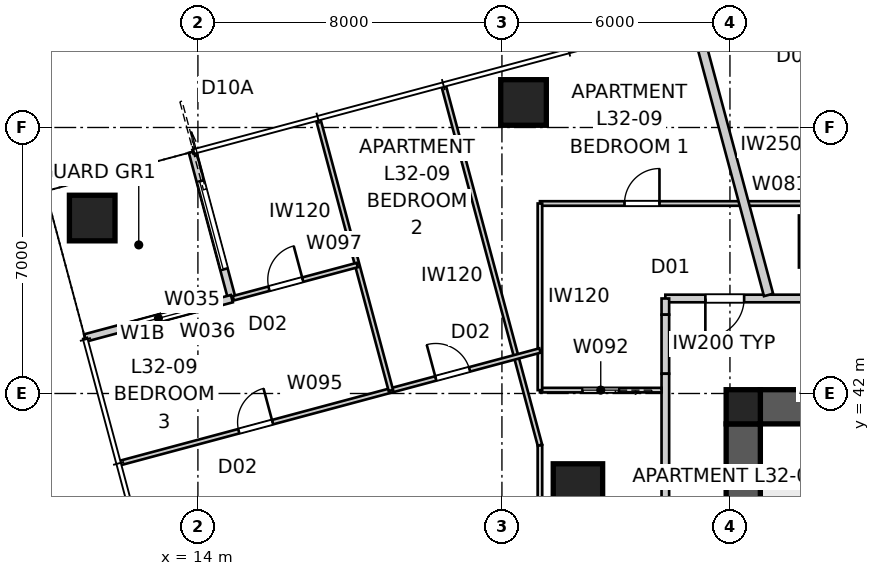
"""IFC4 building model, lengths in metres.
Left out: names, types, materials, properties, quantities, classifications, styles, units other than length and angle.
Written with IfcOpenShell. Run it as: python <this file> out.ifc"""

import sys

from ifc_helpers import new_model, si_unit, direction, frame, frame_2d, origin, origin_2d, place, context, subcontext, project, spatial, polyline, rectangle, outline, extrude, element, fill, save


model = new_model("IFC4")
c1 = context("Model", 3, precision=1e-05, world=origin(), true_north=direction((0.0, 1.0)))
c2 = subcontext(c1, "Body", "Model", "MODEL_VIEW")
j1 = project(units=[si_unit("LENGTHUNIT", "METRE"), si_unit("PLANEANGLEUNIT", "RADIAN")], contexts=[c1])
p1 = place(None, origin())
s1 = spatial("IfcSite", under=j1, at=p1, CompositionType="ELEMENT")
p2 = place(p1, origin())
s2 = spatial("IfcBuilding", under=s1, at=p2, CompositionType="ELEMENT")
p3 = place(p2, frame((0.0, 0.0, 118.4)))
s3 = spatial("IfcBuildingStorey", under=s2, at=p3, CompositionType="ELEMENT", Elevation=118.4)
p4 = place(p3, frame((28.8, 41.65, 0.0), z_axis=(0.0, 0.0, 1.0), x_axis=(1.0, 0.0, 0.0)))
e1 = element("IfcWall", 1, at=p4, inside=s3, PredefinedType="SHEAR", context=c2, shape_type="SweptSolid", body=[
    extrude(outline(polyline([(0.0, -0.45), (22.4, -0.45), (22.4, -0.025), (22.85, -0.025), (22.85, 0.025), (22.4, 0.025), (22.4, 0.45), (0.0, 0.45), (0.0, 0.025), (-0.45, 0.025), (-0.45, -0.025), (0.0, -0.025), (0.0, -0.45)])), origin(), (0.0, 0.0, 1.0), 3.4),
])
p5 = place(p3, frame((28.35, 41.2, 0.0), z_axis=(0.0, 0.0, 1.0), x_axis=(0.0, -1.0, 0.0)))
e2 = element("IfcWall", 2, at=p5, inside=s3, PredefinedType="SHEAR", context=c2, shape_type="SweptSolid", body=[
    extrude(outline(polyline([(0.0, -0.45), (22.4, -0.45), (22.4, -0.025), (22.85, -0.025), (22.85, 0.025), (22.4, 0.025), (22.4, 0.45), (0.0, 0.45), (0.0, 0.025), (-0.45, 0.025), (-0.45, -0.025), (0.0, -0.025), (0.0, -0.45)])), origin(), (0.0, 0.0, 1.0), 3.4),
])
p6 = place(p5, frame((11.14, 0.0, 0.0)))
e3 = element("IfcOpeningElement", 3, at=p6, cuts=e2, PredefinedType="OPENING", context=c2, shape_type="SweptSolid", body=[
    extrude(rectangle(XDim=1.02, YDim=2.4, at=frame_2d((0.51, 1.2))), frame((0.0, 0.46, 0.0), z_axis=(0.0, -1.0, 0.0), x_axis=(1.0, 0.0, 0.0)), (0.0, 0.0, 1.0), 0.92),
])
p7 = place(p3, frame((28.8, 39.75, 0.0), z_axis=(0.0, 0.0, 1.0), x_axis=(1.0, 0.0, 0.0)))
e4 = element("IfcWall", 4, at=p7, inside=s3, PredefinedType="SHEAR", context=c2, shape_type="SweptSolid", body=[
    extrude(rectangle(XDim=3.5, YDim=0.3, at=frame_2d((1.75, 0.0))), origin(), (0.0, 0.0, 1.0), 3.4),
])
p8 = place(p3, frame((28.35, 41.65, 0.0), z_axis=(0.0, 0.0, 1.0), x_axis=(1.0, 0.0, 0.0)))
e5 = element("IfcColumn", 5, at=p8, inside=s3, PredefinedType="COLUMN", context=c2, shape_type="SweptSolid", body=[
    extrude(rectangle(XDim=0.9, YDim=0.9, at=origin_2d()), origin(), (0.0, 0.0, 1.0), 3.4),
])
for number, where, z_axis, x_axis in (
    (6, (22.568, 49.658, 0.0), (0.0, 0.0, 1.0), (1.0, 0.0, 0.0)),
    (7, (11.219, 46.617, 0.0), (0.0, 0.0, 1.0), (1.0, 0.0, 0.0)),
):
    element("IfcColumn", number, at=place(p3, frame(where, z_axis=z_axis, x_axis=x_axis)), inside=s3, PredefinedType="COLUMN", context=c2, shape_type="SweptSolid", body=[
        extrude(rectangle(XDim=1.2, YDim=1.2, at=origin_2d()), origin(), (0.0, 0.0, 1.0), 3.4),
    ])
for number, where, z_axis, x_axis in (
    (8, (30.5, 46.0, 0.0), (0.0, 0.0, 1.0), (1.0, 0.0, 0.0)),
    (9, (24.0, 39.5, 0.0), (0.0, 0.0, 1.0), (1.0, 0.0, 0.0)),
):
    element("IfcColumn", number, at=place(p3, frame(where, z_axis=z_axis, x_axis=x_axis)), inside=s3, PredefinedType="COLUMN", context=c2, shape_type="SweptSolid", body=[
        extrude(rectangle(XDim=1.3, YDim=1.3, at=origin_2d()), origin(), (0.0, 0.0, 1.0), 3.4),
    ])
p9 = place(p3, frame((13.857, 48.359, 0.0), z_axis=(0.0, 0.0, 1.0), x_axis=(0.258843877716, -0.965919172068, 0.0)))
e10 = element("IfcWall", 10, at=p9, inside=s3, PredefinedType="SOLIDWALL", context=c2, shape_type="SweptSolid", body=[
    extrude(rectangle(XDim=4.0, YDim=0.2, at=frame_2d((2.0, 0.0))), origin(), (0.0, 0.0, 1.0), 3.25),
])
p10 = place(p9, frame((0.8, 0.0, 0.0)))
e11 = element("IfcOpeningElement", 11, at=p10, cuts=e10, PredefinedType="OPENING", context=c2, shape_type="SweptSolid", body=[
    extrude(rectangle(XDim=2.4, YDim=2.1, at=frame_2d((1.2, 1.05))), frame((0.0, 0.11, 0.0), z_axis=(0.0, -1.0, 0.0), x_axis=(1.0, 0.0, 0.0)), (0.0, 0.0, 1.0), 0.22),
])
p11 = place(p3, frame((14.893, 44.496, 0.0), z_axis=(0.0, 0.0, 1.0), x_axis=(-0.965934430412, -0.258786931944, 0.0)))
e12 = element("IfcWall", 12, at=p11, inside=s3, PredefinedType="SOLIDWALL", context=c2, shape_type="SweptSolid", body=[
    extrude(rectangle(XDim=4.0, YDim=0.2, at=frame_2d((2.0, 0.0))), origin(), (0.0, 0.0, 1.0), 3.25),
])
p12 = place(p11, frame((1.0, 0.0, 0.45)))
e13 = element("IfcOpeningElement", 13, at=p12, cuts=e12, PredefinedType="OPENING", context=c2, shape_type="SweptSolid", body=[
    extrude(rectangle(XDim=2.0, YDim=1.8, at=frame_2d((1.0, 0.9))), frame((0.0, 0.11, 0.0), z_axis=(0.0, -1.0, 0.0), x_axis=(1.0, 0.0, 0.0)), (0.0, 0.0, 1.0), 0.22),
])
p13 = place(p3, frame((54.5, 44.5, 0.0), z_axis=(0.0, 0.0, 1.0), x_axis=(-1.0, 0.0, 0.0)))
e14 = element("IfcWall", 14, at=p13, inside=s3, PredefinedType="PARTITIONING", context=c2, shape_type="SweptSolid", body=[
    extrude(rectangle(XDim=28.2, YDim=0.2, at=frame_2d((14.1, 0.0))), origin(), (0.0, 0.0, 1.0), 3.25),
])
p14 = place(p13, frame((10.837, 0.0, 0.0)))
e15 = element("IfcOpeningElement", 15, at=p14, cuts=e14, PredefinedType="OPENING", context=c2, shape_type="SweptSolid", body=[
    extrude(rectangle(XDim=1.02, YDim=2.34, at=frame_2d((0.51, 1.17))), frame((0.0, 0.11, 0.0), z_axis=(0.0, -1.0, 0.0), x_axis=(1.0, 0.0, 0.0)), (0.0, 0.0, 1.0), 0.22),
])
p15 = place(p13, frame((5.7, 0.0, 0.0)))
e16 = element("IfcOpeningElement", 16, at=p15, cuts=e14, PredefinedType="OPENING", context=c2, shape_type="SweptSolid", body=[
    extrude(rectangle(XDim=1.02, YDim=2.34, at=frame_2d((0.51, 1.17))), frame((0.0, 0.11, 0.0), z_axis=(0.0, -1.0, 0.0), x_axis=(1.0, 0.0, 0.0)), (0.0, 0.0, 1.0), 0.22),
])
p16 = place(p13, frame((26.127, 0.0, 0.0)))
e17 = element("IfcOpeningElement", 17, at=p16, cuts=e14, PredefinedType="OPENING", context=c2, shape_type="SweptSolid", body=[
    extrude(rectangle(XDim=1.02, YDim=2.34, at=frame_2d((0.51, 1.17))), frame((0.0, 0.11, 0.0), z_axis=(0.0, -1.0, 0.0), x_axis=(1.0, 0.0, 0.0)), (0.0, 0.0, 1.0), 0.22),
])
p17 = place(p3, frame((26.3, 44.5, 0.0), z_axis=(0.0, 0.0, 1.0), x_axis=(0.0, -1.0, 0.0)))
e18 = element("IfcWall", 18, at=p17, inside=s3, PredefinedType="PARTITIONING", context=c2, shape_type="SweptSolid", body=[
    extrude(rectangle(XDim=0.426, YDim=0.2, at=frame_2d((0.213, 0.0))), origin(), (0.0, 0.0, 1.0), 3.25),
])
p18 = place(p3, frame((26.3, 44.074, 0.0), z_axis=(0.0, 0.0, 1.0), x_axis=(0.0, -1.0, 0.0)))
e19 = element("IfcWall", 19, at=p18, inside=s3, PredefinedType="PARTITIONING", context=c2, shape_type="SweptSolid", body=[
    extrude(rectangle(XDim=1.554, YDim=0.2, at=frame_2d((0.777, 0.0))), origin(), (0.0, 0.0, 1.0), 2.722),
])
p19 = place(p3, frame((26.3, 42.52, 0.0), z_axis=(0.0, 0.0, 1.0), x_axis=(0.0, -1.0, 0.0)))
e20 = element("IfcWall", 20, at=p19, inside=s3, PredefinedType="PARTITIONING", context=c2, shape_type="SweptSolid", body=[
    extrude(rectangle(XDim=27.02, YDim=0.2, at=frame_2d((13.51, 0.0))), origin(), (0.0, 0.0, 1.0), 3.25),
])
p20 = place(p19, frame((23.584, 0.0, 0.0)))
e21 = element("IfcOpeningElement", 21, at=p20, cuts=e20, PredefinedType="OPENING", context=c2, shape_type="SweptSolid", body=[
    extrude(rectangle(XDim=1.02, YDim=2.1, at=frame_2d((0.51, 1.05))), frame((0.0, 0.11, 0.0), z_axis=(0.0, -1.0, 0.0), x_axis=(1.0, 0.0, 0.0)), (0.0, 0.0, 1.0), 0.22),
])
p21 = place(p19, frame((13.468, 0.0, 0.0)))
e22 = element("IfcOpeningElement", 22, at=p21, cuts=e20, PredefinedType="OPENING", context=c2, shape_type="SweptSolid", body=[
    extrude(rectangle(XDim=1.02, YDim=2.34, at=frame_2d((0.51, 1.17))), frame((0.0, 0.11, 0.0), z_axis=(0.0, -1.0, 0.0), x_axis=(1.0, 0.0, 0.0)), (0.0, 0.0, 1.0), 0.22),
])
p22 = place(p3, frame((27.058, 51.896, 0.0), z_axis=(0.0, 0.0, 1.0), x_axis=(0.258822171171, -0.965924988656, 0.0)))
e23 = element("IfcWall", 23, at=p22, inside=s3, PredefinedType="PARTITIONING", context=c2, shape_type="SweptSolid", body=[
    extrude(rectangle(XDim=7.56, YDim=0.25, at=frame_2d((3.78, 0.0))), origin(), (0.0, 0.0, 1.0), 3.25),
])
p23 = place(p3, frame((23.0, 13.0, 0.0), z_axis=(0.0, 0.0, 1.0), x_axis=(0.0, 1.0, 0.0)))
e24 = element("IfcWall", 24, at=p23, inside=s3, PredefinedType="PARTITIONING", context=c2, shape_type="SweptSolid", body=[
    extrude(rectangle(XDim=27.64, YDim=0.12, at=frame_2d((13.82, 0.0))), origin(), (0.0, 0.0, 1.0), 2.55),
])
p24 = place(p23, frame((3.192, 0.0, 0.0)))
e25 = element("IfcOpeningElement", 25, at=p24, cuts=e24, PredefinedType="OPENING", context=c2, shape_type="SweptSolid", body=[
    extrude(rectangle(XDim=0.92, YDim=2.34, at=frame_2d((0.46, 1.17))), frame((0.0, 0.07, 0.0), z_axis=(0.0, -1.0, 0.0), x_axis=(1.0, 0.0, 0.0)), (0.0, 0.0, 1.0), 0.14),
])
p25 = place(p23, frame((13.779, 0.0, 0.0)))
e26 = element("IfcOpeningElement", 26, at=p25, cuts=e24, PredefinedType="OPENING", context=c2, shape_type="SweptSolid", body=[
    extrude(rectangle(XDim=0.92, YDim=2.34, at=frame_2d((0.46, 1.17))), frame((0.0, 0.07, 0.0), z_axis=(0.0, -1.0, 0.0), x_axis=(1.0, 0.0, 0.0)), (0.0, 0.0, 1.0), 0.14),
])
p26 = place(p23, frame((16.374, 0.0, 0.0)))
e27 = element("IfcOpeningElement", 27, at=p26, cuts=e24, PredefinedType="OPENING", context=c2, shape_type="SweptSolid", body=[
    extrude(rectangle(XDim=0.92, YDim=2.34, at=frame_2d((0.46, 1.17))), frame((0.0, 0.07, 0.0), z_axis=(0.0, -1.0, 0.0), x_axis=(1.0, 0.0, 0.0)), (0.0, 0.0, 1.0), 0.14),
])
p27 = place(p23, frame((9.743, 0.0, 0.0)))
e28 = element("IfcOpeningElement", 28, at=p27, cuts=e24, PredefinedType="OPENING", context=c2, shape_type="SweptSolid", body=[
    extrude(rectangle(XDim=0.96, YDim=2.1, at=frame_2d((0.48, 1.05))), frame((0.0, 0.07, 0.0), z_axis=(0.0, -1.0, 0.0), x_axis=(1.0, 0.0, 0.0)), (0.0, 0.0, 1.0), 0.14),
])
p28 = place(p23, frame((24.879, 0.0, 0.0)))
e29 = element("IfcOpeningElement", 29, at=p28, cuts=e24, PredefinedType="OPENING", context=c2, shape_type="SweptSolid", body=[
    extrude(rectangle(XDim=0.96, YDim=2.1, at=frame_2d((0.48, 1.05))), frame((0.0, 0.07, 0.0), z_axis=(0.0, -1.0, 0.0), x_axis=(1.0, 0.0, 0.0)), (0.0, 0.0, 1.0), 0.14),
])
p29 = place(p3, frame((23.0, 47.0, 0.0), z_axis=(0.0, 0.0, 1.0), x_axis=(1.0, 0.0, 0.0)))
e30 = element("IfcWall", 30, at=p29, inside=s3, PredefinedType="PARTITIONING", context=c2, shape_type="SweptSolid", body=[
    extrude(rectangle(XDim=25.241, YDim=0.12, at=frame_2d((12.62, 0.0))), origin(), (0.0, 0.0, 1.0), 2.55),
])
p30 = place(p29, frame((21.702, 0.0, 0.0)))
e31 = element("IfcOpeningElement", 31, at=p30, cuts=e30, PredefinedType="OPENING", context=c2, shape_type="SweptSolid", body=[
    extrude(rectangle(XDim=0.92, YDim=2.34, at=frame_2d((0.46, 1.17))), frame((0.0, 0.07, 0.0), z_axis=(0.0, -1.0, 0.0), x_axis=(1.0, 0.0, 0.0)), (0.0, 0.0, 1.0), 0.14),
])
p31 = place(p29, frame((17.598, 0.0, 0.0)))
e32 = element("IfcOpeningElement", 32, at=p31, cuts=e30, PredefinedType="OPENING", context=c2, shape_type="SweptSolid", body=[
    extrude(rectangle(XDim=0.92, YDim=2.34, at=frame_2d((0.46, 1.17))), frame((0.0, 0.07, 0.0), z_axis=(0.0, -1.0, 0.0), x_axis=(1.0, 0.0, 0.0)), (0.0, 0.0, 1.0), 0.14),
])
p32 = place(p29, frame((23.689, 0.0, 0.0)))
e33 = element("IfcOpeningElement", 33, at=p32, cuts=e30, PredefinedType="OPENING", context=c2, shape_type="SweptSolid", body=[
    extrude(rectangle(XDim=0.92, YDim=2.34, at=frame_2d((0.46, 1.17))), frame((0.0, 0.07, 0.0), z_axis=(0.0, -1.0, 0.0), x_axis=(1.0, 0.0, 0.0)), (0.0, 0.0, 1.0), 0.14),
])
p33 = place(p29, frame((2.225, 0.0, 0.0)))
e34 = element("IfcOpeningElement", 34, at=p33, cuts=e30, PredefinedType="OPENING", context=c2, shape_type="SweptSolid", body=[
    extrude(rectangle(XDim=0.92, YDim=2.34, at=frame_2d((0.46, 1.17))), frame((0.0, 0.07, 0.0), z_axis=(0.0, -1.0, 0.0), x_axis=(1.0, 0.0, 0.0)), (0.0, 0.0, 1.0), 0.14),
])
p34 = place(p29, frame((13.709, 0.0, 0.0)))
e35 = element("IfcOpeningElement", 35, at=p34, cuts=e30, PredefinedType="OPENING", context=c2, shape_type="SweptSolid", body=[
    extrude(rectangle(XDim=0.96, YDim=2.1, at=frame_2d((0.48, 1.05))), frame((0.0, 0.07, 0.0), z_axis=(0.0, -1.0, 0.0), x_axis=(1.0, 0.0, 0.0)), (0.0, 0.0, 1.0), 0.14),
])
p35 = place(p3, frame((26.2, 42.089, 0.0), z_axis=(0.0, 0.0, 1.0), x_axis=(-1.0, 0.0, 0.0)))
e36 = element("IfcWall", 36, at=p35, inside=s3, PredefinedType="PARTITIONING", context=c2, shape_type="SweptSolid", body=[
    extrude(rectangle(XDim=3.2, YDim=0.12, at=frame_2d((1.6, 0.0))), origin(), (0.0, 0.0, 1.0), 3.25),
])
p36 = place(p35, frame((1.12, 0.0, 0.0)))
e37 = element("IfcOpeningElement", 37, at=p36, cuts=e36, PredefinedType="OPENING", context=c2, shape_type="SweptSolid", body=[
    extrude(rectangle(XDim=0.96, YDim=2.1, at=frame_2d((0.48, 1.05))), frame((0.0, 0.07, 0.0), z_axis=(0.0, -1.0, 0.0), x_axis=(1.0, 0.0, 0.0)), (0.0, 0.0, 1.0), 0.14),
])
p37 = place(p3, frame((23.0, 42.089, 0.0), z_axis=(0.0, 0.0, 1.0), x_axis=(0.0, 1.0, 0.0)))
e38 = element("IfcWall", 38, at=p37, inside=s3, PredefinedType="PARTITIONING", context=c2, shape_type="SweptSolid", body=[
    extrude(rectangle(XDim=4.911, YDim=0.12, at=frame_2d((2.456, 0.0))), origin(), (0.0, 0.0, 1.0), 3.25),
])
p38 = place(p3, frame((23.0, 40.64, 0.0), z_axis=(0.0, 0.0, 1.0), x_axis=(-0.258790139317, 0.965933571108, 0.0)))
e39 = element("IfcWall", 39, at=p38, inside=s3, PredefinedType="PARTITIONING", context=c2, shape_type="SweptSolid", body=[
    extrude(rectangle(XDim=9.783, YDim=0.12, at=frame_2d((4.892, 0.0))), origin(), (0.0, 0.0, 1.0), 2.638),
])
p39 = place(p3, frame((11.952, 40.17, 0.0), z_axis=(0.0, 0.0, 1.0), x_axis=(0.965923183761, 0.258828906952, 0.0)))
e40 = element("IfcWall", 40, at=p39, inside=s3, PredefinedType="PARTITIONING", context=c2, shape_type="SweptSolid", body=[
    extrude(rectangle(XDim=11.438, YDim=0.12, at=frame_2d((5.719, 0.0))), origin(), (0.0, 0.0, 1.0), 3.25),
])
p40 = place(p39, frame((3.233, 0.0, 0.0)))
e41 = element("IfcOpeningElement", 41, at=p40, cuts=e40, PredefinedType="OPENING", context=c2, shape_type="SweptSolid", body=[
    extrude(rectangle(XDim=0.92, YDim=2.34, at=frame_2d((0.46, 1.17))), frame((0.0, 0.07, 0.0), z_axis=(0.0, -1.0, 0.0), x_axis=(1.0, 0.0, 0.0)), (0.0, 0.0, 1.0), 0.14),
])
p41 = place(p39, frame((8.6, 0.0, 0.0)))
e42 = element("IfcOpeningElement", 42, at=p41, cuts=e40, PredefinedType="OPENING", context=c2, shape_type="SweptSolid", body=[
    extrude(rectangle(XDim=0.92, YDim=2.34, at=frame_2d((0.46, 1.17))), frame((0.0, 0.07, 0.0), z_axis=(0.0, -1.0, 0.0), x_axis=(1.0, 0.0, 0.0)), (0.0, 0.0, 1.0), 0.14),
])
p42 = place(p3, frame((19.077, 42.08, 0.0), z_axis=(0.0, 0.0, 1.0), x_axis=(-0.258846923464, 0.965918355874, 0.0)))
e43 = element("IfcWall", 43, at=p42, inside=s3, PredefinedType="PARTITIONING", context=c2, shape_type="SweptSolid", body=[
    extrude(rectangle(XDim=7.377, YDim=0.12, at=frame_2d((3.688, 0.0))), origin(), (0.0, 0.0, 1.0), 3.25),
])
p43 = place(p3, frame((14.931, 44.506, 0.0), z_axis=(0.0, 0.0, 1.0), x_axis=(0.96593546512, 0.258783069815, 0.0)))
e44 = element("IfcWall", 44, at=p43, inside=s3, PredefinedType="PARTITIONING", context=c2, shape_type="SweptSolid", body=[
    extrude(rectangle(XDim=3.376, YDim=0.12, at=frame_2d((1.688, 0.0))), origin(), (0.0, 0.0, 1.0), 3.25),
])
p44 = place(p43, frame((0.971, 0.0, 0.0)))
e45 = element("IfcOpeningElement", 45, at=p44, cuts=e44, PredefinedType="OPENING", context=c2, shape_type="SweptSolid", body=[
    extrude(rectangle(XDim=0.92, YDim=2.34, at=frame_2d((0.46, 1.17))), frame((0.0, 0.07, 0.0), z_axis=(0.0, -1.0, 0.0), x_axis=(1.0, 0.0, 0.0)), (0.0, 0.0, 1.0), 0.14),
])
p45 = place(p10, origin())
e46 = element("IfcDoor", 46, at=p45, inside=s3, OperationType="SLIDING_TO_LEFT", PredefinedType="DOOR", context=c2, shape_type="SweptSolid", body=[
    extrude(rectangle(XDim=2.4, YDim=2.1, at=frame_2d((1.2, 1.05))), frame((0.0, 0.025, 0.0), z_axis=(0.0, -1.0, 0.0), x_axis=(1.0, 0.0, 0.0)), (0.0, 0.0, 1.0), 0.05),
])
fill(e11, e46)
p46 = place(p12, origin())
e47 = element("IfcWindow", 47, at=p46, inside=s3, PartitioningType="SINGLE_PANEL", PredefinedType="WINDOW", context=c2, shape_type="SweptSolid", body=[
    extrude(rectangle(XDim=2.0, YDim=1.8, at=frame_2d((1.0, 0.9))), frame((0.0, 0.03, 0.0), z_axis=(0.0, -1.0, 0.0), x_axis=(1.0, 0.0, 0.0)), (0.0, 0.0, 1.0), 0.06),
])
fill(e13, e47)
p47 = place(p16, origin())
e48 = element("IfcDoor", 48, at=p47, inside=s3, OperationType="SINGLE_SWING_RIGHT", PredefinedType="DOOR", context=c2, shape_type="SweptSolid", body=[
    extrude(rectangle(XDim=1.02, YDim=2.34, at=frame_2d((0.51, 1.17))), frame((0.0, 0.025, 0.0), z_axis=(0.0, -1.0, 0.0), x_axis=(1.0, 0.0, 0.0)), (0.0, 0.0, 1.0), 0.05),
])
fill(e17, e48)
p48 = place(p33, origin())
e49 = element("IfcDoor", 49, at=p48, inside=s3, OperationType="SINGLE_SWING_RIGHT", PredefinedType="DOOR", context=c2, shape_type="SweptSolid", body=[
    extrude(rectangle(XDim=0.92, YDim=2.34, at=frame_2d((0.46, 1.17))), frame((0.0, 0.025, 0.0), z_axis=(0.0, -1.0, 0.0), x_axis=(1.0, 0.0, 0.0)), (0.0, 0.0, 1.0), 0.05),
])
fill(e34, e49)
p49 = place(p36, origin())
e50 = element("IfcDoor", 50, at=p49, inside=s3, OperationType="SLIDING_TO_LEFT", PredefinedType="DOOR", context=c2, shape_type="SweptSolid", body=[
    extrude(rectangle(XDim=0.96, YDim=2.1, at=frame_2d((0.48, 1.05))), frame((0.0, 0.025, 0.0), z_axis=(0.0, -1.0, 0.0), x_axis=(1.0, 0.0, 0.0)), (0.0, 0.0, 1.0), 0.05),
])
fill(e37, e50)
p50 = place(p40, origin())
e51 = element("IfcDoor", 51, at=p50, inside=s3, OperationType="SINGLE_SWING_RIGHT", PredefinedType="DOOR", context=c2, shape_type="SweptSolid", body=[
    extrude(rectangle(XDim=0.92, YDim=2.34, at=frame_2d((0.46, 1.17))), frame((0.0, 0.025, 0.0), z_axis=(0.0, -1.0, 0.0), x_axis=(1.0, 0.0, 0.0)), (0.0, 0.0, 1.0), 0.05),
])
fill(e41, e51)
p51 = place(p41, origin())
e52 = element("IfcDoor", 52, at=p51, inside=s3, OperationType="SINGLE_SWING_LEFT", PredefinedType="DOOR", context=c2, shape_type="SweptSolid", body=[
    extrude(rectangle(XDim=0.92, YDim=2.34, at=frame_2d((0.46, 1.17))), frame((0.0, 0.025, 0.0), z_axis=(0.0, -1.0, 0.0), x_axis=(1.0, 0.0, 0.0)), (0.0, 0.0, 1.0), 0.05),
])
fill(e42, e52)
p52 = place(p44, origin())
e53 = element("IfcDoor", 53, at=p52, inside=s3, OperationType="SINGLE_SWING_RIGHT", PredefinedType="DOOR", context=c2, shape_type="SweptSolid", body=[
    extrude(rectangle(XDim=0.92, YDim=2.34, at=frame_2d((0.46, 1.17))), frame((0.0, 0.025, 0.0), z_axis=(0.0, -1.0, 0.0), x_axis=(1.0, 0.0, 0.0)), (0.0, 0.0, 1.0), 0.05),
])
fill(e45, e53)
save(model, sys.argv[1])
